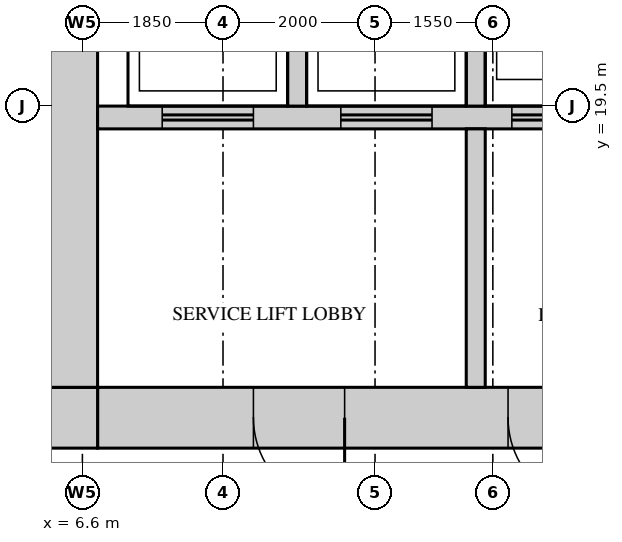
"""IFC4 building model, lengths in metres.
Left out: names, types, materials, properties, quantities, classifications, styles, units other than length and angle.
Written with IfcOpenShell. Run it as: python <this file> out.ifc"""

import sys

from ifc_helpers import new_model, si_unit, direction, frame, frame_2d, origin, place, context, subcontext, project, spatial, rectangle, extrude, source, transform, mapped, element, fill, save


model = new_model("IFC4")
c1 = context("Model", 3, precision=1e-05, world=origin(), true_north=direction((0.0, 1.0)))
c2 = subcontext(c1, "Body", "Model", "MODEL_VIEW")
j1 = project(units=[si_unit("LENGTHUNIT", "METRE"), si_unit("PLANEANGLEUNIT", "RADIAN")], contexts=[c1])
p1 = place(None, origin())
s1 = spatial("IfcSite", under=j1, at=p1, CompositionType="ELEMENT")
p2 = place(p1, origin())
s2 = spatial("IfcBuilding", under=s1, at=p2, CompositionType="ELEMENT")
p3 = place(p2, frame((0.0, 0.0, 176.7)))
s3 = spatial("IfcBuildingStorey", under=s2, at=p3, CompositionType="ELEMENT", Elevation=176.7)
m1 = source(origin(), c2, "Body", "SweptSolid", [
    extrude(rectangle(XDim=13.4, YDim=0.8, at=frame_2d((6.7, 0.0))), origin(), (0.0, 0.0, 1.0), 3.75),
])
p4 = place(p3, frame((6.8, 15.4, 0.0), z_axis=(0.0, 0.0, 1.0), x_axis=(1.0, 0.0, 0.0)))
e1 = element("IfcWall", 1, at=p4, inside=s3, PredefinedType="SHEAR", context=c2, shape_type="MappedRepresentation", body=[
    mapped(m1, transform((0.0, 0.0, 0.0))),
])
m2 = source(origin(), c2, "Body", "SweptSolid", [
    extrude(rectangle(XDim=1.2, YDim=2.1, at=frame_2d((0.6, 1.05))), frame((0.0, 0.41, 0.0), z_axis=(0.0, -1.0, 0.0), x_axis=(1.0, 0.0, 0.0)), (0.0, 0.0, 1.0), 0.82),
])
p5 = place(p4, frame((5.4, 0.0, 0.0)))
e2 = element("IfcOpeningElement", 2, at=p5, cuts=e1, PredefinedType="OPENING", context=c2, shape_type="MappedRepresentation", body=[
    mapped(m2, transform((0.0, 0.0, 0.0))),
])
p6 = place(p4, frame((2.05, 0.0, 0.0)))
e3 = element("IfcOpeningElement", 3, at=p6, cuts=e1, PredefinedType="OPENING", context=c2, shape_type="MappedRepresentation", body=[
    mapped(m2, transform((0.0, 0.0, 0.0))),
])
m3 = source(origin(), c2, "Body", "SweptSolid", [
    extrude(rectangle(XDim=1.0, YDim=2.1, at=frame_2d((0.5, 1.05))), frame((0.0, 0.41, 0.0), z_axis=(0.0, -1.0, 0.0), x_axis=(1.0, 0.0, 0.0)), (0.0, 0.0, 1.0), 0.82),
])
p7 = place(p4, frame((7.9, 0.0, 0.0)))
e4 = element("IfcOpeningElement", 4, at=p7, cuts=e1, PredefinedType="OPENING", context=c2, shape_type="MappedRepresentation", body=[
    mapped(m3, transform((0.0, 0.0, 0.0))),
])
m4 = source(origin(), c2, "Body", "SweptSolid", [
    extrude(rectangle(XDim=0.8, YDim=0.8, at=frame_2d((0.4, 0.0))), origin(), (0.0, 0.0, 1.0), 3.75),
])
p8 = place(p3, frame((6.0, 15.4, 0.0), z_axis=(0.0, 0.0, 1.0), x_axis=(1.0, 0.0, 0.0)))
e5 = element("IfcWall", 5, at=p8, inside=s3, PredefinedType="SHEAR", context=c2, shape_type="MappedRepresentation", body=[
    mapped(m4, transform((0.0, 0.0, 0.0))),
])
m5 = source(origin(), c2, "Body", "SweptSolid", [
    extrude(rectangle(XDim=22.4, YDim=0.8, at=frame_2d((11.2, 0.0))), origin(), (0.0, 0.0, 1.0), 3.75),
])
p9 = place(p3, frame((6.4, 15.8, 0.0), z_axis=(0.0, 0.0, 1.0), x_axis=(0.0, 1.0, 0.0)))
e6 = element("IfcWall", 6, at=p9, inside=s3, PredefinedType="SHEAR", context=c2, shape_type="MappedRepresentation", body=[
    mapped(m5, transform((0.0, 0.0, 0.0))),
])
m6 = source(origin(), c2, "Body", "SweptSolid", [
    extrude(rectangle(XDim=9.275, YDim=0.3, at=frame_2d((4.637, 0.0))), origin(), (0.0, 0.0, 1.0), 3.75),
])
p10 = place(p3, frame((6.8, 19.35, 0.0), z_axis=(0.0, 0.0, 1.0), x_axis=(1.0, 0.0, 0.0)))
e7 = element("IfcWall", 7, at=p10, inside=s3, PredefinedType="STANDARD", context=c2, shape_type="MappedRepresentation", body=[
    mapped(m6, transform((0.0, 0.0, 0.0))),
])
m7 = source(origin(), c2, "Body", "SweptSolid", [
    extrude(rectangle(XDim=1.2, YDim=2.1, at=frame_2d((0.6, 1.05))), frame((0.0, 0.16, 0.0), z_axis=(0.0, -1.0, 0.0), x_axis=(1.0, 0.0, 0.0)), (0.0, 0.0, 1.0), 0.32),
])
p11 = place(p10, frame((0.85, 0.0, 0.0)))
e8 = element("IfcOpeningElement", 8, at=p11, cuts=e7, PredefinedType="OPENING", context=c2, shape_type="MappedRepresentation", body=[
    mapped(m7, transform((0.0, 0.0, 0.0))),
])
p12 = place(p10, frame((3.2, 0.0, 0.0)))
e9 = element("IfcOpeningElement", 9, at=p12, cuts=e7, PredefinedType="OPENING", context=c2, shape_type="MappedRepresentation", body=[
    mapped(m7, transform((0.0, 0.0, 0.0))),
])
p13 = place(p10, frame((5.45, 0.0, 0.0)))
e10 = element("IfcOpeningElement", 10, at=p13, cuts=e7, PredefinedType="OPENING", context=c2, shape_type="MappedRepresentation", body=[
    mapped(m7, transform((0.0, 0.0, 0.0))),
])
p14 = place(p10, frame((7.6, 0.0, 0.0)))
e11 = element("IfcOpeningElement", 11, at=p14, cuts=e7, PredefinedType="OPENING", context=c2, shape_type="MappedRepresentation", body=[
    mapped(m7, transform((0.0, 0.0, 0.0))),
])
m8 = source(origin(), c2, "Body", "SweptSolid", [
    extrude(rectangle(XDim=3.1, YDim=0.25, at=frame_2d((1.55, 0.0))), origin(), (0.0, 0.0, 1.0), 3.75),
])
for number, where, z_axis, x_axis in (
    (12, (9.425, 19.5, 0.0), (0.0, 0.0, 1.0), (0.0, 1.0, 0.0)),
    (13, (11.775, 19.5, 0.0), (0.0, 0.0, 1.0), (0.0, 1.0, 0.0)),
):
    element("IfcWall", number, at=place(p3, frame(where, z_axis=z_axis, x_axis=x_axis)), inside=s3, PredefinedType="STANDARD", context=c2, shape_type="MappedRepresentation", body=[
        mapped(m8, transform((0.0, 0.0, 0.0))),
    ])
m9 = source(origin(), c2, "Body", "SweptSolid", [
    extrude(rectangle(XDim=3.4, YDim=0.25, at=frame_2d((1.7, 0.0))), origin(), (0.0, 0.0, 1.0), 3.75),
])
p15 = place(p3, frame((11.775, 15.8, 0.0), z_axis=(0.0, 0.0, 1.0), x_axis=(0.0, 1.0, 0.0)))
e14 = element("IfcWall", 14, at=p15, inside=s3, PredefinedType="STANDARD", context=c2, shape_type="MappedRepresentation", body=[
    mapped(m9, transform((0.0, 0.0, 0.0))),
])
m10 = source(origin(), c2, "Body", "SweptSolid", [
    extrude(rectangle(XDim=1.2, YDim=2.1, at=frame_2d((0.6, 1.05))), frame((0.0, 0.35, 0.0), z_axis=(0.0, -1.0, 0.0), x_axis=(1.0, 0.0, 0.0)), (0.0, 0.0, 1.0), 0.7),
])
p16 = place(p5, origin())
e15 = element("IfcDoor", 15, at=p16, inside=s3, OperationType="SINGLE_SWING_RIGHT", PredefinedType="DOOR", context=c2, shape_type="MappedRepresentation", body=[
    mapped(m10, transform((0.0, 0.0, 0.0))),
])
fill(e2, e15)
p17 = place(p6, origin())
e16 = element("IfcDoor", 16, at=p17, inside=s3, OperationType="SINGLE_SWING_RIGHT", PredefinedType="DOOR", context=c2, shape_type="MappedRepresentation", body=[
    mapped(m10, transform((0.0, 0.0, 0.0))),
])
fill(e3, e16)
m11 = source(origin(), c2, "Body", "SweptSolid", [
    extrude(rectangle(XDim=1.2, YDim=2.1, at=frame_2d((0.6, 1.05))), frame((0.0, 0.025, 0.0), z_axis=(0.0, -1.0, 0.0), x_axis=(1.0, 0.0, 0.0)), (0.0, 0.0, 1.0), 0.05),
])
p18 = place(p11, origin())
e17 = element("IfcDoor", 17, at=p18, inside=s3, OperationType="DOUBLE_DOOR_SLIDING", PredefinedType="DOOR", context=c2, shape_type="MappedRepresentation", body=[
    mapped(m11, transform((0.0, 0.0, 0.0))),
])
fill(e8, e17)
p19 = place(p12, origin())
e18 = element("IfcDoor", 18, at=p19, inside=s3, OperationType="DOUBLE_DOOR_SLIDING", PredefinedType="DOOR", context=c2, shape_type="MappedRepresentation", body=[
    mapped(m11, transform((0.0, 0.0, 0.0))),
])
fill(e9, e18)
p20 = place(p13, origin())
e19 = element("IfcDoor", 19, at=p20, inside=s3, OperationType="DOUBLE_DOOR_SLIDING", PredefinedType="DOOR", context=c2, shape_type="MappedRepresentation", body=[
    mapped(m11, transform((0.0, 0.0, 0.0))),
])
fill(e10, e19)
save(model, sys.argv[1])
